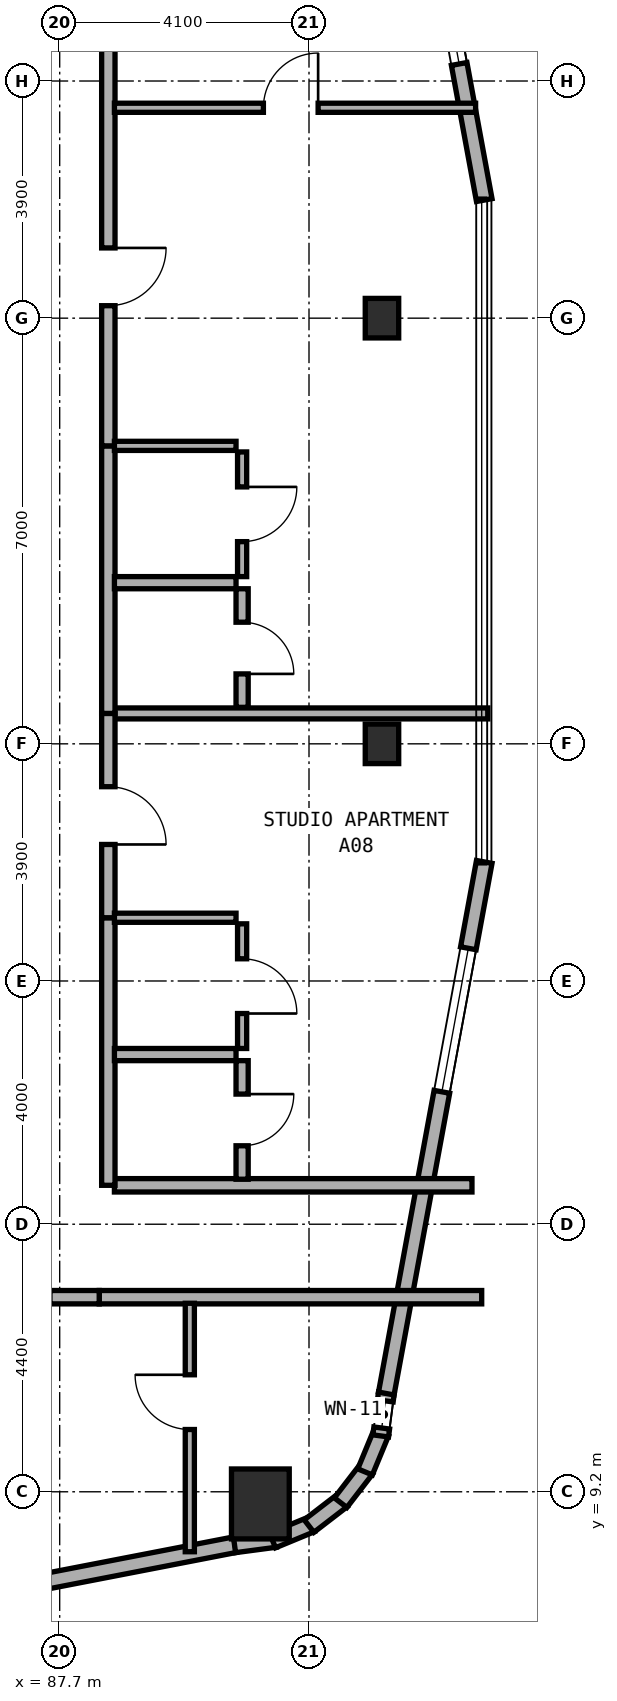
"""IFC4 building model, lengths in metres.
Left out: names, types, materials, properties, quantities, classifications, styles, units other than length and angle.
Written with IfcOpenShell. Run it as: python <this file> out.ifc"""

import sys

from ifc_helpers import new_model, si_unit, direction, frame, frame_2d, origin, origin_2d, place, context, subcontext, project, spatial, rectangle, extrude, element, fill, save


model = new_model("IFC4")
c1 = context("Model", 3, precision=1e-05, world=origin(), true_north=direction((0.0, 1.0)))
c2 = subcontext(c1, "Body", "Model", "MODEL_VIEW")
j1 = project(units=[si_unit("LENGTHUNIT", "METRE"), si_unit("PLANEANGLEUNIT", "RADIAN")], contexts=[c1])
p1 = place(None, origin())
s1 = spatial("IfcSite", under=j1, at=p1, CompositionType="ELEMENT")
p2 = place(p1, origin())
s2 = spatial("IfcBuilding", under=s1, at=p2, CompositionType="ELEMENT")
p3 = place(p2, frame((0.0, 0.0, 109.0)))
s3 = spatial("IfcBuildingStorey", under=s2, at=p3, CompositionType="ELEMENT", Elevation=109.0)
for number, where, z_axis, x_axis in (
    (1, (93.0, 21.5, 0.0), (0.0, 0.0, 1.0), (1.0, 0.0, 0.0)),
    (2, (93.0, 28.5, 0.0), (0.0, 0.0, 1.0), (1.0, 0.0, 0.0)),
):
    element("IfcColumn", number, at=place(p3, frame(where, z_axis=z_axis, x_axis=x_axis)), inside=s3, PredefinedType="COLUMN", context=c2, shape_type="SweptSolid", body=[
        extrude(rectangle(XDim=0.55, YDim=0.65, at=origin_2d()), origin(), (0.0, 0.0, 1.0), 3.5),
    ])
p4 = place(p3, frame((91.0, 9.0, 0.0), z_axis=(0.0, 0.0, 1.0), x_axis=(1.0, 0.0, 0.0)))
e3 = element("IfcColumn", 3, at=p4, inside=s3, PredefinedType="COLUMN", context=c2, shape_type="SweptSolid", body=[
    extrude(rectangle(XDim=0.95, YDim=1.15, at=origin_2d()), origin(), (0.0, 0.0, 1.0), 3.5),
])
p5 = place(p3, frame((82.261, 6.718, 0.0), z_axis=(0.0, 0.0, 1.0), x_axis=(0.981750199588, 0.190175039396, 0.0)))
e4 = element("IfcWall", 4, at=p5, inside=s3, PredefinedType="STANDARD", context=c2, shape_type="SweptSolid", body=[
    extrude(rectangle(XDim=8.477, YDim=0.26, at=frame_2d((4.238, 0.0))), origin(), (0.0, 0.0, 1.0), 3.25),
])
p6 = place(p5, frame((2.623, 0.0, 0.8)))
e5 = element("IfcOpeningElement", 5, at=p6, cuts=e4, PredefinedType="OPENING", context=c2, shape_type="SweptSolid", body=[
    extrude(rectangle(XDim=2.4, YDim=1.6, at=frame_2d((1.2, 0.8))), frame((0.0, 0.14, 0.0), z_axis=(0.0, -1.0, 0.0), x_axis=(1.0, 0.0, 0.0)), (0.0, 0.0, 1.0), 0.28),
])
p7 = place(p3, frame((90.575, 8.328, 0.0), z_axis=(0.0, 0.0, 1.0), x_axis=(0.991300187529, 0.13162043232, 0.0)))
e6 = element("IfcWall", 6, at=p7, inside=s3, PredefinedType="STANDARD", context=c2, shape_type="SweptSolid", body=[
    extrude(rectangle(XDim=0.677, YDim=0.26, at=frame_2d((0.338, 0.0))), origin(), (0.0, 0.0, 1.0), 3.25),
])
for number, where, z_axis, x_axis in (
    (7, (91.2, 8.399, 0.0), (0.0, 0.0, 1.0), (0.924, 0.382, 0.0)),
    (8, (91.801, 8.636, 0.0), (0.0, 0.0, 1.0), (0.793, 0.61, 0.0)),
    (9, (92.32, 9.021, 0.0), (0.0, 0.0, 1.0), (0.609, 0.793, 0.0)),
):
    element("IfcWall", number, at=place(p3, frame(where, z_axis=z_axis, x_axis=x_axis)), inside=s3, PredefinedType="STANDARD", context=c2, shape_type="SweptSolid", body=[
        extrude(rectangle(XDim=0.694, YDim=0.26, at=frame_2d((0.347, 0.0))), origin(), (0.0, 0.0, 1.0), 3.25),
    ])
p8 = place(p3, frame((92.722, 9.527, 0.0), z_axis=(0.0, 0.0, 1.0), x_axis=(0.382289608286, 0.924042561464, 0.0)))
e10 = element("IfcWall", 10, at=p8, inside=s3, PredefinedType="STANDARD", context=c2, shape_type="SweptSolid", body=[
    extrude(rectangle(XDim=0.694, YDim=0.26, at=frame_2d((0.347, 0.0))), origin(), (0.0, 0.0, 1.0), 3.25),
])
p9 = place(p3, frame((92.979, 10.119, 0.0), z_axis=(0.0, 0.0, 1.0), x_axis=(0.130614135366, 0.991433279471, 0.0)))
e11 = element("IfcWall", 11, at=p9, inside=s3, PredefinedType="STANDARD", context=c2, shape_type="SweptSolid", body=[
    extrude(rectangle(XDim=0.712, YDim=0.26, at=frame_2d((0.356, 0.0))), origin(), (0.0, 0.0, 1.0), 3.25),
])
p10 = place(p9, frame((0.131, 0.0, 0.85)))
e12 = element("IfcOpeningElement", 12, at=p10, cuts=e11, PredefinedType="OPENING", context=c2, shape_type="SweptSolid", body=[
    extrude(rectangle(XDim=0.45, YDim=1.5, at=frame_2d((0.225, 0.75))), frame((0.0, 0.14, 0.0), z_axis=(0.0, -1.0, 0.0), x_axis=(1.0, 0.0, 0.0)), (0.0, 0.0, 1.0), 0.28),
])
p11 = place(p3, frame((93.071, 10.816, 0.0), z_axis=(0.0, 0.0, 1.0), x_axis=(0.181209963057, 0.983444431215, 0.0)))
e13 = element("IfcWall", 13, at=p11, inside=s3, PredefinedType="STANDARD", context=c2, shape_type="SweptSolid", body=[
    extrude(rectangle(XDim=8.889, YDim=0.26, at=frame_2d((4.445, 0.0))), origin(), (0.0, 0.0, 1.0), 3.25),
])
p12 = place(p11, frame((5.045, 0.0, 0.8)))
e14 = element("IfcOpeningElement", 14, at=p12, cuts=e13, PredefinedType="OPENING", context=c2, shape_type="SweptSolid", body=[
    extrude(rectangle(XDim=2.4, YDim=1.6, at=frame_2d((1.2, 0.8))), frame((0.0, 0.14, 0.0), z_axis=(0.0, -1.0, 0.0), x_axis=(1.0, 0.0, 0.0)), (0.0, 0.0, 1.0), 0.28),
])
p13 = place(p3, frame((94.682, 30.442, 0.0), z_axis=(0.0, 0.0, 1.0), x_axis=(-0.181209963057, 0.983444431215, 0.0)))
e15 = element("IfcWall", 15, at=p13, inside=s3, PredefinedType="STANDARD", context=c2, shape_type="SweptSolid", body=[
    extrude(rectangle(XDim=8.889, YDim=0.26, at=frame_2d((4.445, 0.0))), origin(), (0.0, 0.0, 1.0), 3.25),
])
p14 = place(p13, frame((2.276, 0.0, 0.8)))
e16 = element("IfcOpeningElement", 16, at=p14, cuts=e15, PredefinedType="OPENING", context=c2, shape_type="SweptSolid", body=[
    extrude(rectangle(XDim=2.4, YDim=1.6, at=frame_2d((1.2, 0.8))), frame((0.0, 0.14, 0.0), z_axis=(0.0, -1.0, 0.0), x_axis=(1.0, 0.0, 0.0)), (0.0, 0.0, 1.0), 0.28),
])
p15 = place(p3, frame((88.35, 12.4, 0.0), z_axis=(0.0, 0.0, 1.0), x_axis=(1.0, 0.0, 0.0)))
e17 = element("IfcWall", 17, at=p15, inside=s3, PredefinedType="SOLIDWALL", context=c2, shape_type="SweptSolid", body=[
    extrude(rectangle(XDim=6.29, YDim=0.22, at=frame_2d((3.145, 0.0))), origin(), (0.0, 0.0, 1.0), 2.945),
])
p16 = place(p3, frame((85.78, 12.4, 0.0), z_axis=(0.0, 0.0, 1.0), x_axis=(1.0, 0.0, 0.0)))
e18 = element("IfcWall", 18, at=p16, inside=s3, PredefinedType="SOLIDWALL", context=c2, shape_type="SweptSolid", body=[
    extrude(rectangle(XDim=2.57, YDim=0.22, at=frame_2d((1.285, 0.0))), origin(), (0.0, 0.0, 1.0), 3.22),
])
p17 = place(p16, frame((0.81, 0.0, 0.0)))
e19 = element("IfcOpeningElement", 19, at=p17, cuts=e18, PredefinedType="OPENING", context=c2, shape_type="SweptSolid", body=[
    extrude(rectangle(XDim=0.95, YDim=2.1, at=frame_2d((0.475, 1.05))), frame((0.0, 0.12, 0.0), z_axis=(0.0, -1.0, 0.0), x_axis=(1.0, 0.0, 0.0)), (0.0, 0.0, 1.0), 0.24),
])
p18 = place(p3, frame((89.84, 8.214, 0.0), z_axis=(0.0, 0.0, 1.0), x_axis=(0.0, 1.0, 0.0)))
e20 = element("IfcWall", 20, at=p18, inside=s3, PredefinedType="PARTITIONING", context=c2, shape_type="SweptSolid", body=[
    extrude(rectangle(XDim=4.086, YDim=0.15, at=frame_2d((2.043, 0.0))), origin(), (0.0, 0.0, 1.0), 2.945),
])
p19 = place(p18, frame((2.01, 0.0, 0.0)))
e21 = element("IfcOpeningElement", 21, at=p19, cuts=e20, PredefinedType="OPENING", context=c2, shape_type="SweptSolid", body=[
    extrude(rectangle(XDim=0.9, YDim=2.1, at=frame_2d((0.45, 1.05))), frame((0.0, 0.085, 0.0), z_axis=(0.0, -1.0, 0.0), x_axis=(1.0, 0.0, 0.0)), (0.0, 0.0, 1.0), 0.17),
])
p20 = place(p3, frame((88.6, 14.24, 0.0), z_axis=(0.0, 0.0, 1.0), x_axis=(1.0, 0.0, 0.0)))
e22 = element("IfcWall", 22, at=p20, inside=s3, PredefinedType="SOLIDWALL", context=c2, shape_type="SweptSolid", body=[
    extrude(rectangle(XDim=5.88, YDim=0.22, at=frame_2d((2.94, 0.0))), origin(), (0.0, 0.0, 1.0), 2.945),
])
p21 = place(p3, frame((88.5, 22.0, 0.0), z_axis=(0.0, 0.0, 1.0), x_axis=(1.0, 0.0, 0.0)))
e23 = element("IfcWall", 23, at=p21, inside=s3, PredefinedType="SOLIDWALL", context=c2, shape_type="SweptSolid", body=[
    extrude(rectangle(XDim=6.24, YDim=0.18, at=frame_2d((3.12, 0.0))), origin(), (0.0, 0.0, 1.0), 2.945),
])
p22 = place(p3, frame((88.5, 14.24, 0.0), z_axis=(0.0, 0.0, 1.0), x_axis=(0.0, 1.0, 0.0)))
e24 = element("IfcWall", 24, at=p22, inside=s3, PredefinedType="SOLIDWALL", context=c2, shape_type="SweptSolid", body=[
    extrude(rectangle(XDim=4.4, YDim=0.22, at=frame_2d((2.2, 0.0))), origin(), (0.0, 0.0, 1.0), 3.22),
])
p23 = place(p3, frame((88.5, 18.64, 0.0), z_axis=(0.0, 0.0, 1.0), x_axis=(0.0, 1.0, 0.0)))
e25 = element("IfcWall", 25, at=p23, inside=s3, PredefinedType="SOLIDWALL", context=c2, shape_type="SweptSolid", body=[
    extrude(rectangle(XDim=3.36, YDim=0.22, at=frame_2d((1.68, 0.0))), origin(), (0.0, 0.0, 1.0), 2.825),
])
p24 = place(p23, frame((1.205, 0.0, 0.0)))
e26 = element("IfcOpeningElement", 26, at=p24, cuts=e25, PredefinedType="OPENING", context=c2, shape_type="SweptSolid", body=[
    extrude(rectangle(XDim=0.95, YDim=2.1, at=frame_2d((0.475, 1.05))), frame((0.0, 0.12, 0.0), z_axis=(0.0, -1.0, 0.0), x_axis=(1.0, 0.0, 0.0)), (0.0, 0.0, 1.0), 0.24),
])
p25 = place(p3, frame((88.6, 16.39, 0.0), z_axis=(0.0, 0.0, 1.0), x_axis=(1.0, 0.0, 0.0)))
e27 = element("IfcWall", 27, at=p25, inside=s3, PredefinedType="PLUMBINGWALL", context=c2, shape_type="SweptSolid", body=[
    extrude(rectangle(XDim=2.0, YDim=0.2, at=frame_2d((1.0, 0.0))), origin(), (0.0, 0.0, 1.0), 3.22),
])
p26 = place(p3, frame((88.6, 18.64, 0.0), z_axis=(0.0, 0.0, 1.0), x_axis=(1.0, 0.0, 0.0)))
e28 = element("IfcWall", 28, at=p26, inside=s3, PredefinedType="PARTITIONING", context=c2, shape_type="SweptSolid", body=[
    extrude(rectangle(XDim=2.0, YDim=0.15, at=frame_2d((1.0, 0.0))), origin(), (0.0, 0.0, 1.0), 3.22),
])
p27 = place(p3, frame((90.7, 14.34, 0.0), z_axis=(0.0, 0.0, 1.0), x_axis=(0.0, 1.0, 0.0)))
e29 = element("IfcWall", 29, at=p27, inside=s3, PredefinedType="PLUMBINGWALL", context=c2, shape_type="SweptSolid", body=[
    extrude(rectangle(XDim=1.95, YDim=0.2, at=frame_2d((0.975, 0.0))), origin(), (0.0, 0.0, 1.0), 3.22),
])
p28 = place(p27, frame((0.55, 0.0, 0.0)))
e30 = element("IfcOpeningElement", 30, at=p28, cuts=e29, PredefinedType="OPENING", context=c2, shape_type="SweptSolid", body=[
    extrude(rectangle(XDim=0.85, YDim=2.1, at=frame_2d((0.425, 1.05))), frame((0.0, 0.11, 0.0), z_axis=(0.0, -1.0, 0.0), x_axis=(1.0, 0.0, 0.0)), (0.0, 0.0, 1.0), 0.22),
])
p29 = place(p3, frame((90.7, 16.49, 0.0), z_axis=(0.0, 0.0, 1.0), x_axis=(0.0, 1.0, 0.0)))
e31 = element("IfcWall", 31, at=p29, inside=s3, PredefinedType="PARTITIONING", context=c2, shape_type="SweptSolid", body=[
    extrude(rectangle(XDim=2.05, YDim=0.15, at=frame_2d((1.025, 0.0))), origin(), (0.0, 0.0, 1.0), 3.22),
])
p30 = place(p29, frame((0.575, 0.0, 0.0)))
e32 = element("IfcOpeningElement", 32, at=p30, cuts=e31, PredefinedType="OPENING", context=c2, shape_type="SweptSolid", body=[
    extrude(rectangle(XDim=0.9, YDim=2.1, at=frame_2d((0.45, 1.05))), frame((0.0, 0.085, 0.0), z_axis=(0.0, -1.0, 0.0), x_axis=(1.0, 0.0, 0.0)), (0.0, 0.0, 1.0), 0.17),
])
p31 = place(p3, frame((88.5, 22.0, 0.0), z_axis=(0.0, 0.0, 1.0), x_axis=(0.0, 1.0, 0.0)))
e33 = element("IfcWall", 33, at=p31, inside=s3, PredefinedType="SOLIDWALL", context=c2, shape_type="SweptSolid", body=[
    extrude(rectangle(XDim=4.4, YDim=0.22, at=frame_2d((2.2, 0.0))), origin(), (0.0, 0.0, 1.0), 3.22),
])
p32 = place(p3, frame((88.5, 26.4, 0.0), z_axis=(0.0, 0.0, 1.0), x_axis=(0.0, 1.0, 0.0)))
e34 = element("IfcWall", 34, at=p32, inside=s3, PredefinedType="SOLIDWALL", context=c2, shape_type="SweptSolid", body=[
    extrude(rectangle(XDim=9.36, YDim=0.22, at=frame_2d((4.68, 0.0))), origin(), (0.0, 0.0, 1.0), 2.825),
])
p33 = place(p32, frame((2.305, 0.0, 0.0)))
e35 = element("IfcOpeningElement", 35, at=p33, cuts=e34, PredefinedType="OPENING", context=c2, shape_type="SweptSolid", body=[
    extrude(rectangle(XDim=0.95, YDim=2.1, at=frame_2d((0.475, 1.05))), frame((0.0, 0.12, 0.0), z_axis=(0.0, -1.0, 0.0), x_axis=(1.0, 0.0, 0.0)), (0.0, 0.0, 1.0), 0.24),
])
p34 = place(p3, frame((88.6, 31.96, 0.0), z_axis=(0.0, 0.0, 1.0), x_axis=(1.0, 0.0, 0.0)))
e36 = element("IfcWall", 36, at=p34, inside=s3, PredefinedType="PARTITIONING", context=c2, shape_type="SweptSolid", body=[
    extrude(rectangle(XDim=5.94, YDim=0.15, at=frame_2d((2.97, 0.0))), origin(), (0.0, 0.0, 1.0), 2.945),
])
p35 = place(p34, frame((2.45, 0.0, 0.0)))
e37 = element("IfcOpeningElement", 37, at=p35, cuts=e36, PredefinedType="OPENING", context=c2, shape_type="SweptSolid", body=[
    extrude(rectangle(XDim=0.9, YDim=2.1, at=frame_2d((0.45, 1.05))), frame((0.0, 0.085, 0.0), z_axis=(0.0, -1.0, 0.0), x_axis=(1.0, 0.0, 0.0)), (0.0, 0.0, 1.0), 0.17),
])
p36 = place(p3, frame((88.6, 24.15, 0.0), z_axis=(0.0, 0.0, 1.0), x_axis=(1.0, 0.0, 0.0)))
e38 = element("IfcWall", 38, at=p36, inside=s3, PredefinedType="PLUMBINGWALL", context=c2, shape_type="SweptSolid", body=[
    extrude(rectangle(XDim=2.0, YDim=0.2, at=frame_2d((1.0, 0.0))), origin(), (0.0, 0.0, 1.0), 3.22),
])
p37 = place(p3, frame((88.6, 26.4, 0.0), z_axis=(0.0, 0.0, 1.0), x_axis=(1.0, 0.0, 0.0)))
e39 = element("IfcWall", 39, at=p37, inside=s3, PredefinedType="PARTITIONING", context=c2, shape_type="SweptSolid", body=[
    extrude(rectangle(XDim=2.0, YDim=0.15, at=frame_2d((1.0, 0.0))), origin(), (0.0, 0.0, 1.0), 3.22),
])
p38 = place(p3, frame((90.7, 22.1, 0.0), z_axis=(0.0, 0.0, 1.0), x_axis=(0.0, 1.0, 0.0)))
e40 = element("IfcWall", 40, at=p38, inside=s3, PredefinedType="PLUMBINGWALL", context=c2, shape_type="SweptSolid", body=[
    extrude(rectangle(XDim=1.95, YDim=0.2, at=frame_2d((0.975, 0.0))), origin(), (0.0, 0.0, 1.0), 3.22),
])
p39 = place(p38, frame((0.55, 0.0, 0.0)))
e41 = element("IfcOpeningElement", 41, at=p39, cuts=e40, PredefinedType="OPENING", context=c2, shape_type="SweptSolid", body=[
    extrude(rectangle(XDim=0.85, YDim=2.1, at=frame_2d((0.425, 1.05))), frame((0.0, 0.11, 0.0), z_axis=(0.0, -1.0, 0.0), x_axis=(1.0, 0.0, 0.0)), (0.0, 0.0, 1.0), 0.22),
])
p40 = place(p3, frame((90.7, 24.25, 0.0), z_axis=(0.0, 0.0, 1.0), x_axis=(0.0, 1.0, 0.0)))
e42 = element("IfcWall", 42, at=p40, inside=s3, PredefinedType="PARTITIONING", context=c2, shape_type="SweptSolid", body=[
    extrude(rectangle(XDim=2.05, YDim=0.15, at=frame_2d((1.025, 0.0))), origin(), (0.0, 0.0, 1.0), 3.22),
])
p41 = place(p40, frame((0.575, 0.0, 0.0)))
e43 = element("IfcOpeningElement", 43, at=p41, cuts=e42, PredefinedType="OPENING", context=c2, shape_type="SweptSolid", body=[
    extrude(rectangle(XDim=0.9, YDim=2.1, at=frame_2d((0.45, 1.05))), frame((0.0, 0.085, 0.0), z_axis=(0.0, -1.0, 0.0), x_axis=(1.0, 0.0, 0.0)), (0.0, 0.0, 1.0), 0.17),
])
p42 = place(p12, origin())
e44 = element("IfcWindow", 44, at=p42, inside=s3, PartitioningType="SINGLE_PANEL", PredefinedType="WINDOW", context=c2, shape_type="SweptSolid", body=[
    extrude(rectangle(XDim=2.4, YDim=1.6, at=frame_2d((1.2, 0.8))), frame((0.0, 0.03, 0.0), z_axis=(0.0, -1.0, 0.0), x_axis=(1.0, 0.0, 0.0)), (0.0, 0.0, 1.0), 0.06),
])
fill(e14, e44)
p43 = place(p14, origin())
e45 = element("IfcWindow", 45, at=p43, inside=s3, PartitioningType="SINGLE_PANEL", PredefinedType="WINDOW", context=c2, shape_type="SweptSolid", body=[
    extrude(rectangle(XDim=2.4, YDim=1.6, at=frame_2d((1.2, 0.8))), frame((0.0, 0.03, 0.0), z_axis=(0.0, -1.0, 0.0), x_axis=(1.0, 0.0, 0.0)), (0.0, 0.0, 1.0), 0.06),
])
fill(e16, e45)
p44 = place(p10, origin())
e46 = element("IfcWindow", 46, at=p44, inside=s3, PartitioningType="SINGLE_PANEL", PredefinedType="WINDOW", context=c2, shape_type="SweptSolid", body=[
    extrude(rectangle(XDim=0.45, YDim=1.5, at=frame_2d((0.225, 0.75))), frame((0.0, 0.03, 0.0), z_axis=(0.0, -1.0, 0.0), x_axis=(1.0, 0.0, 0.0)), (0.0, 0.0, 1.0), 0.06),
])
fill(e12, e46)
p45 = place(p19, origin())
e47 = element("IfcDoor", 47, at=p45, inside=s3, OperationType="SINGLE_SWING_RIGHT", PredefinedType="DOOR", context=c2, shape_type="SweptSolid", body=[
    extrude(rectangle(XDim=0.9, YDim=2.1, at=frame_2d((0.45, 1.05))), frame((0.0, 0.025, 0.0), z_axis=(0.0, -1.0, 0.0), x_axis=(1.0, 0.0, 0.0)), (0.0, 0.0, 1.0), 0.05),
])
fill(e21, e47)
p46 = place(p24, frame((0.95, 0.0, 0.0), z_axis=(0.0, 0.0, 1.0), x_axis=(-1.0, 0.0, 0.0)))
e48 = element("IfcDoor", 48, at=p46, inside=s3, OperationType="SINGLE_SWING_RIGHT", PredefinedType="DOOR", context=c2, shape_type="SweptSolid", body=[
    extrude(rectangle(XDim=0.95, YDim=2.1, at=frame_2d((0.475, 1.05))), frame((0.0, 0.025, 0.0), z_axis=(0.0, -1.0, 0.0), x_axis=(1.0, 0.0, 0.0)), (0.0, 0.0, 1.0), 0.05),
])
fill(e26, e48)
p47 = place(p28, frame((0.85, 0.0, 0.0), z_axis=(0.0, 0.0, 1.0), x_axis=(-1.0, 0.0, 0.0)))
e49 = element("IfcDoor", 49, at=p47, inside=s3, OperationType="SINGLE_SWING_LEFT", PredefinedType="DOOR", context=c2, shape_type="SweptSolid", body=[
    extrude(rectangle(XDim=0.85, YDim=2.1, at=frame_2d((0.425, 1.05))), frame((0.0, 0.025, 0.0), z_axis=(0.0, -1.0, 0.0), x_axis=(1.0, 0.0, 0.0)), (0.0, 0.0, 1.0), 0.05),
])
fill(e30, e49)
p48 = place(p30, frame((0.9, 0.0, 0.0), z_axis=(0.0, 0.0, 1.0), x_axis=(-1.0, 0.0, 0.0)))
e50 = element("IfcDoor", 50, at=p48, inside=s3, OperationType="SINGLE_SWING_RIGHT", PredefinedType="DOOR", context=c2, shape_type="SweptSolid", body=[
    extrude(rectangle(XDim=0.9, YDim=2.1, at=frame_2d((0.45, 1.05))), frame((0.0, 0.025, 0.0), z_axis=(0.0, -1.0, 0.0), x_axis=(1.0, 0.0, 0.0)), (0.0, 0.0, 1.0), 0.05),
])
fill(e32, e50)
p49 = place(p33, frame((0.95, 0.0, 0.0), z_axis=(0.0, 0.0, 1.0), x_axis=(-1.0, 0.0, 0.0)))
e51 = element("IfcDoor", 51, at=p49, inside=s3, OperationType="SINGLE_SWING_LEFT", PredefinedType="DOOR", context=c2, shape_type="SweptSolid", body=[
    extrude(rectangle(XDim=0.95, YDim=2.1, at=frame_2d((0.475, 1.05))), frame((0.0, 0.025, 0.0), z_axis=(0.0, -1.0, 0.0), x_axis=(1.0, 0.0, 0.0)), (0.0, 0.0, 1.0), 0.05),
])
fill(e35, e51)
p50 = place(p35, origin())
e52 = element("IfcDoor", 52, at=p50, inside=s3, OperationType="SINGLE_SWING_RIGHT", PredefinedType="DOOR", context=c2, shape_type="SweptSolid", body=[
    extrude(rectangle(XDim=0.9, YDim=2.1, at=frame_2d((0.45, 1.05))), frame((0.0, 0.025, 0.0), z_axis=(0.0, -1.0, 0.0), x_axis=(1.0, 0.0, 0.0)), (0.0, 0.0, 1.0), 0.05),
])
fill(e37, e52)
p51 = place(p39, frame((0.85, 0.0, 0.0), z_axis=(0.0, 0.0, 1.0), x_axis=(-1.0, 0.0, 0.0)))
e53 = element("IfcDoor", 53, at=p51, inside=s3, OperationType="SINGLE_SWING_RIGHT", PredefinedType="DOOR", context=c2, shape_type="SweptSolid", body=[
    extrude(rectangle(XDim=0.85, YDim=2.1, at=frame_2d((0.425, 1.05))), frame((0.0, 0.025, 0.0), z_axis=(0.0, -1.0, 0.0), x_axis=(1.0, 0.0, 0.0)), (0.0, 0.0, 1.0), 0.05),
])
fill(e41, e53)
p52 = place(p41, frame((0.9, 0.0, 0.0), z_axis=(0.0, 0.0, 1.0), x_axis=(-1.0, 0.0, 0.0)))
e54 = element("IfcDoor", 54, at=p52, inside=s3, OperationType="SINGLE_SWING_LEFT", PredefinedType="DOOR", context=c2, shape_type="SweptSolid", body=[
    extrude(rectangle(XDim=0.9, YDim=2.1, at=frame_2d((0.45, 1.05))), frame((0.0, 0.025, 0.0), z_axis=(0.0, -1.0, 0.0), x_axis=(1.0, 0.0, 0.0)), (0.0, 0.0, 1.0), 0.05),
])
fill(e43, e54)
save(model, sys.argv[1])
